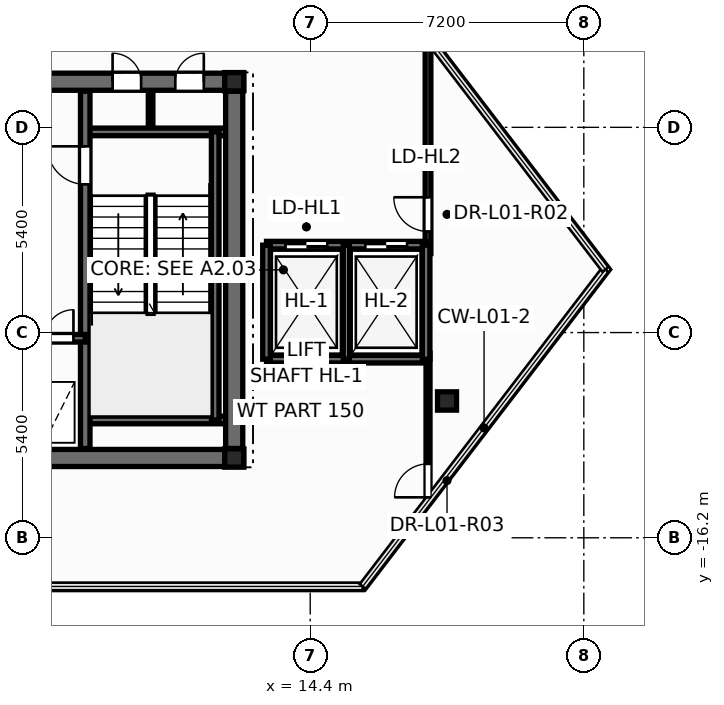
"""IFC4 building model, lengths in metres.
Left out: names, types, materials, properties, quantities, classifications, styles, units other than length and angle.
Written with IfcOpenShell. Run it as: python <this file> out.ifc"""

import sys

from ifc_helpers import new_model, si_unit, direction, frame, frame_2d, origin, origin_2d, place, context, subcontext, project, spatial, rectangle, i_section, extrude, element, fill, save


model = new_model("IFC4")
c1 = context("Model", 3, precision=1e-05, world=origin(), true_north=direction((0.0, 1.0)))
c2 = subcontext(c1, "Body", "Model", "MODEL_VIEW")
j1 = project(units=[si_unit("LENGTHUNIT", "METRE"), si_unit("PLANEANGLEUNIT", "RADIAN")], contexts=[c1])
p1 = place(None, origin())
s1 = spatial("IfcSite", under=j1, at=p1, CompositionType="ELEMENT")
p2 = place(p1, origin())
s2 = spatial("IfcBuilding", under=s1, at=p2, CompositionType="ELEMENT")
p3 = place(p2, frame((0.0, 0.0, 5.4)))
s3 = spatial("IfcBuildingStorey", under=s2, at=p3, CompositionType="ELEMENT", Elevation=5.4)
for number, where, z_axis, x_axis in (
    (1, (12.4, -14.1, 0.0), (0.0, 0.0, 1.0), (1.0, 0.0, 0.0)),
    (2, (12.4, -4.2, 0.0), (0.0, 0.0, 1.0), (1.0, 0.0, 0.0)),
    (3, (18.0, -12.6, 0.0), (0.0, 0.0, 1.0), (1.0, 0.0, 0.0)),
):
    element("IfcColumn", number, at=place(p3, frame(where, z_axis=z_axis, x_axis=x_axis)), inside=s3, PredefinedType="COLUMN", context=c2, shape_type="SweptSolid", body=[
        extrude(i_section(OverallWidth=0.5, OverallDepth=0.482, WebThickness=0.04, FlangeThickness=0.045, at=origin_2d()), origin(), (0.0, 0.0, 1.0), 4.5),
    ])
p4 = place(p3, frame((10.2, -5.52, 0.0), z_axis=(0.0, 0.0, 1.0), x_axis=(0.0, 1.0, 0.0)))
e4 = element("IfcWall", 4, at=p4, inside=s3, PredefinedType="PARTITIONING", context=c2, shape_type="SweptSolid", body=[
    extrude(rectangle(XDim=1.12, YDim=0.12, at=frame_2d((0.56, 0.0))), origin(), (0.0, 0.0, 1.0), 4.22),
])
p5 = place(p3, frame((-12.65, -14.1, 0.0), z_axis=(0.0, 0.0, 1.0), x_axis=(1.0, 0.0, 0.0)))
e5 = element("IfcWall", 5, at=p5, inside=s3, PredefinedType="SHEAR", context=c2, shape_type="SweptSolid", body=[
    extrude(rectangle(XDim=25.3, YDim=0.45, at=frame_2d((12.65, 0.0))), origin(), (0.0, 0.0, 1.0), 4.5),
])
p6 = place(p3, frame((-12.65, -4.2, 0.0), z_axis=(0.0, 0.0, 1.0), x_axis=(1.0, 0.0, 0.0)))
e6 = element("IfcWall", 6, at=p6, inside=s3, PredefinedType="SHEAR", context=c2, shape_type="SweptSolid", body=[
    extrude(rectangle(XDim=25.3, YDim=0.45, at=frame_2d((12.65, 0.0))), origin(), (0.0, 0.0, 1.0), 4.5),
])
p7 = place(p6, frame((1.85, 0.0, 0.0)))
e7 = element("IfcOpeningElement", 7, at=p7, cuts=e6, PredefinedType="OPENING", context=c2, shape_type="SweptSolid", body=[
    extrude(rectangle(XDim=0.756, YDim=2.054, at=frame_2d((0.375, 1.027))), frame((0.0, 0.235, 0.0), z_axis=(0.0, -1.0, 0.0), x_axis=(1.0, 0.0, 0.0)), (0.0, 0.0, 1.0), 0.47),
])
p8 = place(p6, frame((21.85, 0.0, 0.0)))
e8 = element("IfcOpeningElement", 8, at=p8, cuts=e6, PredefinedType="OPENING", context=c2, shape_type="SweptSolid", body=[
    extrude(rectangle(XDim=0.756, YDim=2.054, at=frame_2d((0.375, 1.027))), frame((0.0, 0.235, 0.0), z_axis=(0.0, -1.0, 0.0), x_axis=(1.0, 0.0, 0.0)), (0.0, 0.0, 1.0), 0.47),
])
p9 = place(p6, frame((23.5, 0.0, 0.0)))
e9 = element("IfcOpeningElement", 9, at=p9, cuts=e6, PredefinedType="OPENING", context=c2, shape_type="SweptSolid", body=[
    extrude(rectangle(XDim=0.756, YDim=2.054, at=frame_2d((0.375, 1.027))), frame((0.0, 0.235, 0.0), z_axis=(0.0, -1.0, 0.0), x_axis=(1.0, 0.0, 0.0)), (0.0, 0.0, 1.0), 0.47),
])
p10 = place(p6, frame((5.85, 0.0, 0.0)))
e10 = element("IfcOpeningElement", 10, at=p10, cuts=e6, PredefinedType="OPENING", context=c2, shape_type="SweptSolid", body=[
    extrude(rectangle(XDim=1.006, YDim=2.104, at=frame_2d((0.5, 1.052))), frame((0.0, 0.235, 0.0), z_axis=(0.0, -1.0, 0.0), x_axis=(1.0, 0.0, 0.0)), (0.0, 0.0, 1.0), 0.47),
])
p11 = place(p6, frame((10.35, 0.0, 0.0)))
e11 = element("IfcOpeningElement", 11, at=p11, cuts=e6, PredefinedType="OPENING", context=c2, shape_type="SweptSolid", body=[
    extrude(rectangle(XDim=1.406, YDim=2.154, at=frame_2d((0.7, 1.077))), frame((0.0, 0.235, 0.0), z_axis=(0.0, -1.0, 0.0), x_axis=(1.0, 0.0, 0.0)), (0.0, 0.0, 1.0), 0.47),
])
p12 = place(p6, frame((18.45, 0.0, 0.0)))
e12 = element("IfcOpeningElement", 12, at=p12, cuts=e6, PredefinedType="OPENING", context=c2, shape_type="SweptSolid", body=[
    extrude(rectangle(XDim=1.006, YDim=2.104, at=frame_2d((0.5, 1.052))), frame((0.0, 0.235, 0.0), z_axis=(0.0, -1.0, 0.0), x_axis=(1.0, 0.0, 0.0)), (0.0, 0.0, 1.0), 0.47),
])
for number, where, z_axis, x_axis in (
    (13, (8.48, -5.52, 0.0), (0.0, 0.0, 1.0), (1.0, 0.0, 0.0)),
    (14, (8.48, -13.1, 0.0), (0.0, 0.0, 1.0), (1.0, 0.0, 0.0)),
):
    element("IfcWall", number, at=place(p3, frame(where, z_axis=z_axis, x_axis=x_axis)), inside=s3, PredefinedType="SOLIDWALL", context=c2, shape_type="SweptSolid", body=[
        extrude(rectangle(XDim=3.87, YDim=0.2, at=frame_2d((1.935, 0.0))), origin(), (0.0, 0.0, 1.0), 4.5),
    ])
p13 = place(p3, frame((11.9, -13.1, 0.0), z_axis=(0.0, 0.0, 1.0), x_axis=(0.0, 1.0, 0.0)))
e15 = element("IfcWall", 15, at=p13, inside=s3, PredefinedType="SOLIDWALL", context=c2, shape_type="SweptSolid", body=[
    extrude(rectangle(XDim=7.58, YDim=0.2, at=frame_2d((3.79, 0.0))), origin(), (0.0, 0.0, 1.0), 4.5),
])
p14 = place(p3, frame((8.48, -13.85, 0.0), z_axis=(0.0, 0.0, 1.0), x_axis=(0.0, 1.0, 0.0)))
e16 = element("IfcWall", 16, at=p14, inside=s3, PredefinedType="SHEAR", context=c2, shape_type="SweptSolid", body=[
    extrude(rectangle(XDim=9.4, YDim=0.25, at=frame_2d((4.7, 0.0))), origin(), (0.0, 0.0, 1.0), 4.5),
])
p15 = place(p14, frame((6.95, 0.0, 0.0)))
e17 = element("IfcOpeningElement", 17, at=p15, cuts=e16, PredefinedType="OPENING", context=c2, shape_type="SweptSolid", body=[
    extrude(rectangle(XDim=1.006, YDim=2.104, at=frame_2d((0.5, 1.052))), frame((0.0, 0.135, 0.0), z_axis=(0.0, -1.0, 0.0), x_axis=(1.0, 0.0, 0.0)), (0.0, 0.0, 1.0), 0.27),
])
p16 = place(p3, frame((5.12, -10.95, 0.0), z_axis=(0.0, 0.0, 1.0), x_axis=(1.0, 0.0, 0.0)))
e18 = element("IfcWall", 18, at=p16, inside=s3, PredefinedType="SOLIDWALL", context=c2, shape_type="SweptSolid", body=[
    extrude(rectangle(XDim=3.36, YDim=0.2, at=frame_2d((1.68, 0.0))), origin(), (0.0, 0.0, 1.0), 4.5),
])
p17 = place(p16, frame((0.42, 0.0, 0.0)))
e19 = element("IfcOpeningElement", 19, at=p17, cuts=e18, PredefinedType="OPENING", context=c2, shape_type="SweptSolid", body=[
    extrude(rectangle(XDim=1.106, YDim=2.104, at=frame_2d((0.55, 1.052))), frame((0.0, 0.11, 0.0), z_axis=(0.0, -1.0, 0.0), x_axis=(1.0, 0.0, 0.0)), (0.0, 0.0, 1.0), 0.22),
])
p18 = place(p16, frame((2.3, 0.0, 0.0)))
e20 = element("IfcOpeningElement", 20, at=p18, cuts=e18, PredefinedType="OPENING", context=c2, shape_type="SweptSolid", body=[
    extrude(rectangle(XDim=0.756, YDim=2.054, at=frame_2d((0.375, 1.027))), frame((0.0, 0.11, 0.0), z_axis=(0.0, -1.0, 0.0), x_axis=(1.0, 0.0, 0.0)), (0.0, 0.0, 1.0), 0.22),
])
p19 = place(p3, frame((12.4, -13.85, 0.0), z_axis=(0.0, 0.0, 1.0), x_axis=(0.0, 1.0, 0.0)))
e21 = element("IfcWall", 21, at=p19, inside=s3, PredefinedType="SHEAR", context=c2, shape_type="SweptSolid", body=[
    extrude(rectangle(XDim=9.4, YDim=0.45, at=frame_2d((4.7, 0.0))), origin(), (0.0, 0.0, 1.0), 4.5),
])
p20 = place(p3, frame((17.5, -8.72, 0.0), z_axis=(0.0, 0.0, 1.0), x_axis=(0.0, 1.0, 0.0)))
e22 = element("IfcWall", 22, at=p20, inside=s3, PredefinedType="PARTITIONING", context=c2, shape_type="SweptSolid", body=[
    extrude(rectangle(XDim=5.675, YDim=0.15, at=frame_2d((2.838, 0.0))), origin(), (0.0, 0.0, 1.0), 4.068),
])
p21 = place(p20, frame((0.58, 0.0, 0.0)))
e23 = element("IfcOpeningElement", 23, at=p21, cuts=e22, PredefinedType="OPENING", context=c2, shape_type="SweptSolid", body=[
    extrude(rectangle(XDim=0.906, YDim=2.104, at=frame_2d((0.45, 1.052))), frame((0.0, 0.085, 0.0), z_axis=(0.0, -1.0, 0.0), x_axis=(1.0, 0.0, 0.0)), (0.0, 0.0, 1.0), 0.17),
])
p22 = place(p3, frame((13.25, -11.5, 0.0), z_axis=(0.0, 0.0, 1.0), x_axis=(1.0, 0.0, 0.0)))
e24 = element("IfcWall", 24, at=p22, inside=s3, PredefinedType="SOLIDWALL", context=c2, shape_type="SweptSolid", body=[
    extrude(rectangle(XDim=4.2, YDim=0.2, at=frame_2d((2.1, 0.0))), origin(), (0.0, 0.0, 1.0), 4.5),
])
p23 = place(p3, frame((13.25, -8.5, 0.0), z_axis=(0.0, 0.0, 1.0), x_axis=(1.0, 0.0, 0.0)))
e25 = element("IfcWall", 25, at=p23, inside=s3, PredefinedType="SOLIDWALL", context=c2, shape_type="SweptSolid", body=[
    extrude(rectangle(XDim=4.2, YDim=0.2, at=frame_2d((2.1, 0.0))), origin(), (0.0, 0.0, 1.0), 4.5),
])
p24 = place(p23, frame((0.5, 0.0, 0.0)))
e26 = element("IfcOpeningElement", 26, at=p24, cuts=e25, PredefinedType="OPENING", context=c2, shape_type="SweptSolid", body=[
    extrude(rectangle(XDim=1.106, YDim=2.104, at=frame_2d((0.55, 1.052))), frame((0.0, 0.11, 0.0), z_axis=(0.0, -1.0, 0.0), x_axis=(1.0, 0.0, 0.0)), (0.0, 0.0, 1.0), 0.22),
])
p25 = place(p23, frame((2.6, 0.0, 0.0)))
e27 = element("IfcOpeningElement", 27, at=p25, cuts=e25, PredefinedType="OPENING", context=c2, shape_type="SweptSolid", body=[
    extrude(rectangle(XDim=1.106, YDim=2.104, at=frame_2d((0.55, 1.052))), frame((0.0, 0.11, 0.0), z_axis=(0.0, -1.0, 0.0), x_axis=(1.0, 0.0, 0.0)), (0.0, 0.0, 1.0), 0.22),
])
p26 = place(p3, frame((17.5, -15.236, 0.0), z_axis=(0.0, 0.0, 1.0), x_axis=(0.0, 1.0, 0.0)))
e28 = element("IfcWall", 28, at=p26, inside=s3, PredefinedType="PARTITIONING", context=c2, shape_type="SweptSolid", body=[
    extrude(rectangle(XDim=3.896, YDim=0.105, at=frame_2d((1.948, 0.0))), origin(), (0.0, 0.0, 1.0), 4.068),
])
p27 = place(p26, frame((0.1, 0.0, 0.0)))
e29 = element("IfcOpeningElement", 29, at=p27, cuts=e28, PredefinedType="OPENING", context=c2, shape_type="SweptSolid", body=[
    extrude(rectangle(XDim=0.886, YDim=2.104, at=frame_2d((0.44, 1.052))), frame((0.0, 0.062, 0.0), z_axis=(0.0, -1.0, 0.0), x_axis=(1.0, 0.0, 0.0)), (0.0, 0.0, 1.0), 0.125),
])
for number, where, z_axis, x_axis in (
    (30, (13.25, -11.5, 0.0), (0.0, 0.0, 1.0), (0.0, 1.0, 0.0)),
    (31, (17.45, -11.5, 0.0), (0.0, 0.0, 1.0), (0.0, 1.0, 0.0)),
):
    element("IfcWall", number, at=place(p3, frame(where, z_axis=z_axis, x_axis=x_axis)), inside=s3, PredefinedType="SOLIDWALL", context=c2, shape_type="SweptSolid", body=[
        extrude(rectangle(XDim=3.0, YDim=0.2, at=frame_2d((1.5, 0.0))), origin(), (0.0, 0.0, 1.0), 4.5),
    ])
p28 = place(p3, frame((15.35, -11.5, 0.0), z_axis=(0.0, 0.0, 1.0), x_axis=(0.0, 1.0, 0.0)))
e32 = element("IfcWall", 32, at=p28, inside=s3, PredefinedType="PARTITIONING", context=c2, shape_type="SweptSolid", body=[
    extrude(rectangle(XDim=3.0, YDim=0.16, at=frame_2d((1.5, 0.0))), origin(), (0.0, 0.0, 1.0), 4.22),
])
p29 = place(p15, origin())
e33 = element("IfcDoor", 33, at=p29, inside=s3, OperationType="SINGLE_SWING_RIGHT", PredefinedType="DOOR", context=c2, shape_type="SweptSolid", body=[
    extrude(rectangle(XDim=1.0, YDim=2.1, at=frame_2d((0.5, 1.05))), frame((0.0, 0.025, 0.0), z_axis=(0.0, -1.0, 0.0), x_axis=(1.0, 0.0, 0.0)), (0.0, 0.0, 1.0), 0.05),
])
fill(e17, e33)
p30 = place(p18, origin())
e34 = element("IfcDoor", 34, at=p30, inside=s3, OperationType="SINGLE_SWING_RIGHT", PredefinedType="DOOR", context=c2, shape_type="SweptSolid", body=[
    extrude(rectangle(XDim=0.75, YDim=2.05, at=frame_2d((0.375, 1.025))), frame((0.0, 0.025, 0.0), z_axis=(0.0, -1.0, 0.0), x_axis=(1.0, 0.0, 0.0)), (0.0, 0.0, 1.0), 0.05),
])
fill(e20, e34)
p31 = place(p8, origin())
e35 = element("IfcDoor", 35, at=p31, inside=s3, OperationType="SINGLE_SWING_LEFT", PredefinedType="DOOR", context=c2, shape_type="SweptSolid", body=[
    extrude(rectangle(XDim=0.75, YDim=2.05, at=frame_2d((0.375, 1.025))), frame((0.0, 0.025, 0.0), z_axis=(0.0, -1.0, 0.0), x_axis=(1.0, 0.0, 0.0)), (0.0, 0.0, 1.0), 0.05),
])
fill(e8, e35)
p32 = place(p9, origin())
e36 = element("IfcDoor", 36, at=p32, inside=s3, OperationType="SINGLE_SWING_RIGHT", PredefinedType="DOOR", context=c2, shape_type="SweptSolid", body=[
    extrude(rectangle(XDim=0.75, YDim=2.05, at=frame_2d((0.375, 1.025))), frame((0.0, 0.025, 0.0), z_axis=(0.0, -1.0, 0.0), x_axis=(1.0, 0.0, 0.0)), (0.0, 0.0, 1.0), 0.05),
])
fill(e9, e36)
p33 = place(p24, origin())
e37 = element("IfcDoor", 37, at=p33, inside=s3, OperationType="DOUBLE_DOOR_SLIDING", PredefinedType="DOOR", context=c2, shape_type="SweptSolid", body=[
    extrude(rectangle(XDim=1.1, YDim=2.1, at=frame_2d((0.55, 1.05))), frame((0.0, 0.025, 0.0), z_axis=(0.0, -1.0, 0.0), x_axis=(1.0, 0.0, 0.0)), (0.0, 0.0, 1.0), 0.05),
])
fill(e26, e37)
p34 = place(p25, origin())
e38 = element("IfcDoor", 38, at=p34, inside=s3, OperationType="DOUBLE_DOOR_SLIDING", PredefinedType="DOOR", context=c2, shape_type="SweptSolid", body=[
    extrude(rectangle(XDim=1.1, YDim=2.1, at=frame_2d((0.55, 1.05))), frame((0.0, 0.025, 0.0), z_axis=(0.0, -1.0, 0.0), x_axis=(1.0, 0.0, 0.0)), (0.0, 0.0, 1.0), 0.05),
])
fill(e27, e38)
p35 = place(p21, origin())
e39 = element("IfcDoor", 39, at=p35, inside=s3, OperationType="SINGLE_SWING_RIGHT", PredefinedType="DOOR", context=c2, shape_type="SweptSolid", body=[
    extrude(rectangle(XDim=0.9, YDim=2.1, at=frame_2d((0.45, 1.05))), frame((0.0, 0.025, 0.0), z_axis=(0.0, -1.0, 0.0), x_axis=(1.0, 0.0, 0.0)), (0.0, 0.0, 1.0), 0.05),
])
fill(e23, e39)
p36 = place(p27, origin())
e40 = element("IfcDoor", 40, at=p36, inside=s3, OperationType="SINGLE_SWING_LEFT", PredefinedType="DOOR", context=c2, shape_type="SweptSolid", body=[
    extrude(rectangle(XDim=0.88, YDim=2.1, at=frame_2d((0.44, 1.05))), frame((0.0, 0.025, 0.0), z_axis=(0.0, -1.0, 0.0), x_axis=(1.0, 0.0, 0.0)), (0.0, 0.0, 1.0), 0.05),
])
fill(e29, e40)
save(model, sys.argv[1])
